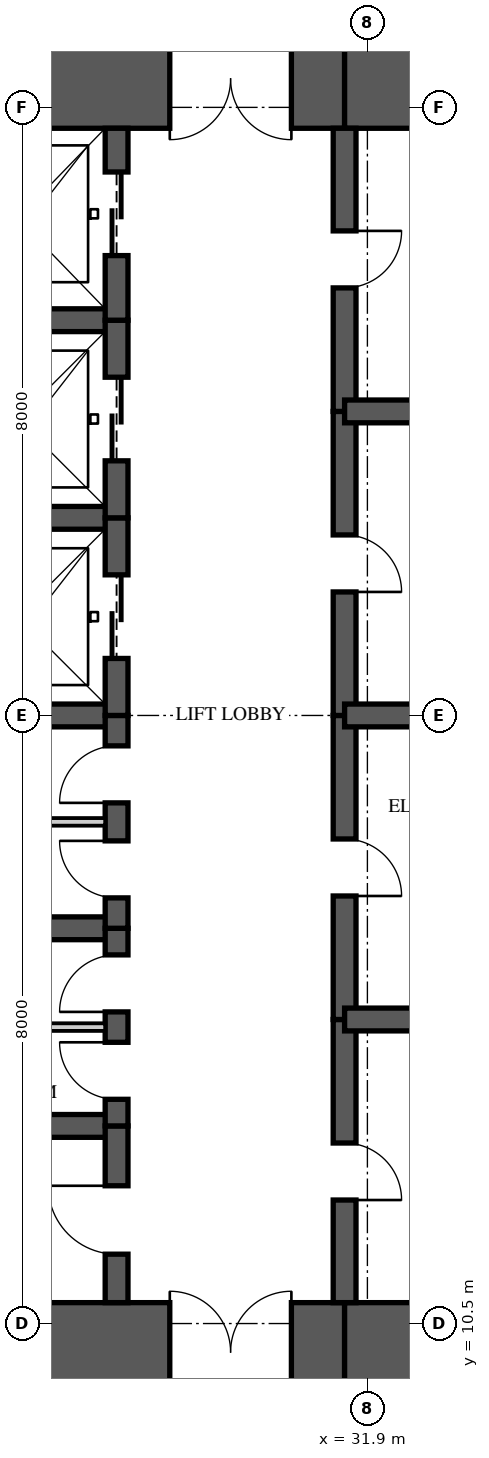
"""IFC4 building model, lengths in metres.
Left out: names, types, materials, properties, quantities, classifications, styles, units other than length and angle.
Written with IfcOpenShell. Run it as: python <this file> out.ifc"""

import sys

from ifc_helpers import new_model, si_unit, direction, frame, frame_2d, origin, place, context, subcontext, project, spatial, rectangle, extrude, element, fill, save


model = new_model("IFC4")
c1 = context("Model", 3, precision=1e-05, world=origin(), true_north=direction((0.0, 1.0)))
c2 = subcontext(c1, "Body", "Model", "MODEL_VIEW")
j1 = project(units=[si_unit("LENGTHUNIT", "METRE"), si_unit("PLANEANGLEUNIT", "RADIAN")], contexts=[c1])
p1 = place(None, origin())
s1 = spatial("IfcSite", under=j1, at=p1, CompositionType="ELEMENT")
p2 = place(p1, origin())
s2 = spatial("IfcBuilding", under=s1, at=p2, CompositionType="ELEMENT")
p3 = place(p2, frame((0.0, 0.0, 191.2)))
s3 = spatial("IfcBuildingStorey", under=s2, at=p3, CompositionType="ELEMENT", Elevation=191.2)
p4 = place(p3, frame((26.0, 10.125, 0.0), z_axis=(0.0, 0.0, 1.0), x_axis=(1.0, 0.0, 0.0)))
e1 = element("IfcWall", 1, at=p4, inside=s3, PredefinedType="SHEAR", context=c2, shape_type="SweptSolid", body=[
    extrude(rectangle(XDim=5.6, YDim=1.3, at=frame_2d((2.8, 0.0))), origin(), (0.0, 0.0, 1.0), 3.35),
])
p5 = place(p4, frame((3.3, 0.0, 0.0)))
e2 = element("IfcOpeningElement", 2, at=p5, cuts=e1, PredefinedType="OPENING", context=c2, shape_type="SweptSolid", body=[
    extrude(rectangle(XDim=1.6, YDim=2.1, at=frame_2d((0.8, 1.05))), frame((0.0, 0.66, 0.0), z_axis=(0.0, -1.0, 0.0), x_axis=(1.0, 0.0, 0.0)), (0.0, 0.0, 1.0), 1.32),
])
for number, where, z_axis, x_axis in (
    (3, (31.6, 10.125, 0.0), (0.0, 0.0, 1.0), (1.0, 0.0, 0.0)),
    (4, (35.9, 26.875, 0.0), (0.0, 0.0, 1.0), (-1.0, 0.0, 0.0)),
):
    element("IfcWall", number, at=place(p3, frame(where, z_axis=z_axis, x_axis=x_axis)), inside=s3, PredefinedType="SHEAR", context=c2, shape_type="SweptSolid", body=[
        extrude(rectangle(XDim=4.3, YDim=1.3, at=frame_2d((2.15, 0.0))), origin(), (0.0, 0.0, 1.0), 3.35),
    ])
p6 = place(p3, frame((31.6, 26.875, 0.0), z_axis=(0.0, 0.0, 1.0), x_axis=(-1.0, 0.0, 0.0)))
e5 = element("IfcWall", 5, at=p6, inside=s3, PredefinedType="SHEAR", context=c2, shape_type="SweptSolid", body=[
    extrude(rectangle(XDim=5.6, YDim=1.3, at=frame_2d((2.8, 0.0))), origin(), (0.0, 0.0, 1.0), 3.35),
])
p7 = place(p6, frame((0.7, 0.0, 0.0)))
e6 = element("IfcOpeningElement", 6, at=p7, cuts=e5, PredefinedType="OPENING", context=c2, shape_type="SweptSolid", body=[
    extrude(rectangle(XDim=1.6, YDim=2.1, at=frame_2d((0.8, 1.05))), frame((0.0, 0.66, 0.0), z_axis=(0.0, -1.0, 0.0), x_axis=(1.0, 0.0, 0.0)), (0.0, 0.0, 1.0), 1.32),
])
p8 = place(p3, frame((28.6, 10.775, 0.0), z_axis=(0.0, 0.0, 1.0), x_axis=(0.0, 1.0, 0.0)))
e7 = element("IfcWall", 7, at=p8, inside=s3, PredefinedType="SHEAR", context=c2, shape_type="SweptSolid", body=[
    extrude(rectangle(XDim=2.325, YDim=0.3, at=frame_2d((1.163, 0.0))), origin(), (0.0, 0.0, 1.0), 3.35),
])
p9 = place(p8, frame((0.637, 0.0, 0.0)))
e8 = element("IfcOpeningElement", 8, at=p9, cuts=e7, PredefinedType="OPENING", context=c2, shape_type="SweptSolid", body=[
    extrude(rectangle(XDim=0.9, YDim=2.1, at=frame_2d((0.45, 1.05))), frame((0.0, 0.16, 0.0), z_axis=(0.0, -1.0, 0.0), x_axis=(1.0, 0.0, 0.0)), (0.0, 0.0, 1.0), 0.32),
])
p10 = place(p3, frame((28.6, 13.1, 0.0), z_axis=(0.0, 0.0, 1.0), x_axis=(0.0, 1.0, 0.0)))
e9 = element("IfcWall", 9, at=p10, inside=s3, PredefinedType="SHEAR", context=c2, shape_type="SweptSolid", body=[
    extrude(rectangle(XDim=2.6, YDim=0.3, at=frame_2d((1.3, 0.0))), origin(), (0.0, 0.0, 1.0), 3.35),
])
p11 = place(p10, frame((0.35, 0.0, 0.0)))
e10 = element("IfcOpeningElement", 10, at=p11, cuts=e9, PredefinedType="OPENING", context=c2, shape_type="SweptSolid", body=[
    extrude(rectangle(XDim=0.75, YDim=2.1, at=frame_2d((0.375, 1.05))), frame((0.0, 0.16, 0.0), z_axis=(0.0, -1.0, 0.0), x_axis=(1.0, 0.0, 0.0)), (0.0, 0.0, 1.0), 0.32),
])
p12 = place(p10, frame((1.5, 0.0, 0.0)))
e11 = element("IfcOpeningElement", 11, at=p12, cuts=e9, PredefinedType="OPENING", context=c2, shape_type="SweptSolid", body=[
    extrude(rectangle(XDim=0.75, YDim=2.1, at=frame_2d((0.375, 1.05))), frame((0.0, 0.16, 0.0), z_axis=(0.0, -1.0, 0.0), x_axis=(1.0, 0.0, 0.0)), (0.0, 0.0, 1.0), 0.32),
])
p13 = place(p3, frame((28.6, 15.7, 0.0), z_axis=(0.0, 0.0, 1.0), x_axis=(0.0, 1.0, 0.0)))
e12 = element("IfcWall", 12, at=p13, inside=s3, PredefinedType="SHEAR", context=c2, shape_type="SweptSolid", body=[
    extrude(rectangle(XDim=2.8, YDim=0.3, at=frame_2d((1.4, 0.0))), origin(), (0.0, 0.0, 1.0), 3.35),
])
p14 = place(p13, frame((0.4, 0.0, 0.0)))
e13 = element("IfcOpeningElement", 13, at=p14, cuts=e12, PredefinedType="OPENING", context=c2, shape_type="SweptSolid", body=[
    extrude(rectangle(XDim=0.75, YDim=2.1, at=frame_2d((0.375, 1.05))), frame((0.0, 0.16, 0.0), z_axis=(0.0, -1.0, 0.0), x_axis=(1.0, 0.0, 0.0)), (0.0, 0.0, 1.0), 0.32),
])
p15 = place(p13, frame((1.65, 0.0, 0.0)))
e14 = element("IfcOpeningElement", 14, at=p15, cuts=e12, PredefinedType="OPENING", context=c2, shape_type="SweptSolid", body=[
    extrude(rectangle(XDim=0.75, YDim=2.1, at=frame_2d((0.375, 1.05))), frame((0.0, 0.16, 0.0), z_axis=(0.0, -1.0, 0.0), x_axis=(1.0, 0.0, 0.0)), (0.0, 0.0, 1.0), 0.32),
])
p16 = place(p3, frame((28.6, 18.5, 0.0), z_axis=(0.0, 0.0, 1.0), x_axis=(0.0, 1.0, 0.0)))
e15 = element("IfcWall", 15, at=p16, inside=s3, PredefinedType="SHEAR", context=c2, shape_type="SweptSolid", body=[
    extrude(rectangle(XDim=2.6, YDim=0.3, at=frame_2d((1.3, 0.0))), origin(), (0.0, 0.0, 1.0), 3.35),
])
p17 = place(p16, frame((0.75, 0.0, 0.0)))
e16 = element("IfcOpeningElement", 16, at=p17, cuts=e15, PredefinedType="OPENING", context=c2, shape_type="SweptSolid", body=[
    extrude(rectangle(XDim=1.1, YDim=2.1, at=frame_2d((0.55, 1.05))), frame((0.0, 0.16, 0.0), z_axis=(0.0, -1.0, 0.0), x_axis=(1.0, 0.0, 0.0)), (0.0, 0.0, 1.0), 0.32),
])
p18 = place(p3, frame((28.6, 21.1, 0.0), z_axis=(0.0, 0.0, 1.0), x_axis=(0.0, 1.0, 0.0)))
e17 = element("IfcWall", 17, at=p18, inside=s3, PredefinedType="SHEAR", context=c2, shape_type="SweptSolid", body=[
    extrude(rectangle(XDim=2.6, YDim=0.3, at=frame_2d((1.3, 0.0))), origin(), (0.0, 0.0, 1.0), 3.35),
])
p19 = place(p18, frame((0.75, 0.0, 0.0)))
e18 = element("IfcOpeningElement", 18, at=p19, cuts=e17, PredefinedType="OPENING", context=c2, shape_type="SweptSolid", body=[
    extrude(rectangle(XDim=1.1, YDim=2.1, at=frame_2d((0.55, 1.05))), frame((0.0, 0.16, 0.0), z_axis=(0.0, -1.0, 0.0), x_axis=(1.0, 0.0, 0.0)), (0.0, 0.0, 1.0), 0.32),
])
p20 = place(p3, frame((28.6, 23.7, 0.0), z_axis=(0.0, 0.0, 1.0), x_axis=(0.0, 1.0, 0.0)))
e19 = element("IfcWall", 19, at=p20, inside=s3, PredefinedType="SHEAR", context=c2, shape_type="SweptSolid", body=[
    extrude(rectangle(XDim=2.525, YDim=0.3, at=frame_2d((1.263, 0.0))), origin(), (0.0, 0.0, 1.0), 3.35),
])
p21 = place(p20, frame((0.85, 0.0, 0.0)))
e20 = element("IfcOpeningElement", 20, at=p21, cuts=e19, PredefinedType="OPENING", context=c2, shape_type="SweptSolid", body=[
    extrude(rectangle(XDim=1.1, YDim=2.1, at=frame_2d((0.55, 1.05))), frame((0.0, 0.16, 0.0), z_axis=(0.0, -1.0, 0.0), x_axis=(1.0, 0.0, 0.0)), (0.0, 0.0, 1.0), 0.32),
])
p22 = place(p3, frame((31.6, 10.775, 0.0), z_axis=(0.0, 0.0, 1.0), x_axis=(0.0, 1.0, 0.0)))
e21 = element("IfcWall", 21, at=p22, inside=s3, PredefinedType="SHEAR", context=c2, shape_type="SweptSolid", body=[
    extrude(rectangle(XDim=3.725, YDim=0.3, at=frame_2d((1.863, 0.0))), origin(), (0.0, 0.0, 1.0), 3.35),
])
p23 = place(p22, frame((1.35, 0.0, 0.0)))
e22 = element("IfcOpeningElement", 22, at=p23, cuts=e21, PredefinedType="OPENING", context=c2, shape_type="SweptSolid", body=[
    extrude(rectangle(XDim=0.75, YDim=2.1, at=frame_2d((0.375, 1.05))), frame((0.0, 0.16, 0.0), z_axis=(0.0, -1.0, 0.0), x_axis=(1.0, 0.0, 0.0)), (0.0, 0.0, 1.0), 0.32),
])
p24 = place(p3, frame((31.6, 14.5, 0.0), z_axis=(0.0, 0.0, 1.0), x_axis=(0.0, 1.0, 0.0)))
e23 = element("IfcWall", 23, at=p24, inside=s3, PredefinedType="SHEAR", context=c2, shape_type="SweptSolid", body=[
    extrude(rectangle(XDim=4.0, YDim=0.3, at=frame_2d((2.0, 0.0))), origin(), (0.0, 0.0, 1.0), 3.35),
])
p25 = place(p24, frame((1.625, 0.0, 0.0)))
e24 = element("IfcOpeningElement", 24, at=p25, cuts=e23, PredefinedType="OPENING", context=c2, shape_type="SweptSolid", body=[
    extrude(rectangle(XDim=0.75, YDim=2.1, at=frame_2d((0.375, 1.05))), frame((0.0, 0.16, 0.0), z_axis=(0.0, -1.0, 0.0), x_axis=(1.0, 0.0, 0.0)), (0.0, 0.0, 1.0), 0.32),
])
p26 = place(p3, frame((31.6, 18.5, 0.0), z_axis=(0.0, 0.0, 1.0), x_axis=(0.0, 1.0, 0.0)))
e25 = element("IfcWall", 25, at=p26, inside=s3, PredefinedType="SHEAR", context=c2, shape_type="SweptSolid", body=[
    extrude(rectangle(XDim=4.0, YDim=0.3, at=frame_2d((2.0, 0.0))), origin(), (0.0, 0.0, 1.0), 3.35),
])
p27 = place(p26, frame((1.625, 0.0, 0.0)))
e26 = element("IfcOpeningElement", 26, at=p27, cuts=e25, PredefinedType="OPENING", context=c2, shape_type="SweptSolid", body=[
    extrude(rectangle(XDim=0.75, YDim=2.1, at=frame_2d((0.375, 1.05))), frame((0.0, 0.16, 0.0), z_axis=(0.0, -1.0, 0.0), x_axis=(1.0, 0.0, 0.0)), (0.0, 0.0, 1.0), 0.32),
])
p28 = place(p3, frame((31.6, 22.5, 0.0), z_axis=(0.0, 0.0, 1.0), x_axis=(0.0, 1.0, 0.0)))
e27 = element("IfcWall", 27, at=p28, inside=s3, PredefinedType="SHEAR", context=c2, shape_type="SweptSolid", body=[
    extrude(rectangle(XDim=3.725, YDim=0.3, at=frame_2d((1.863, 0.0))), origin(), (0.0, 0.0, 1.0), 3.35),
])
p29 = place(p28, frame((1.625, 0.0, 0.0)))
e28 = element("IfcOpeningElement", 28, at=p29, cuts=e27, PredefinedType="OPENING", context=c2, shape_type="SweptSolid", body=[
    extrude(rectangle(XDim=0.75, YDim=2.1, at=frame_2d((0.375, 1.05))), frame((0.0, 0.16, 0.0), z_axis=(0.0, -1.0, 0.0), x_axis=(1.0, 0.0, 0.0)), (0.0, 0.0, 1.0), 0.32),
])
for number, where, z_axis, x_axis in (
    (29, (26.0, 13.1, 0.0), (0.0, 0.0, 1.0), (1.0, 0.0, 0.0)),
    (30, (26.0, 15.7, 0.0), (0.0, 0.0, 1.0), (1.0, 0.0, 0.0)),
    (31, (26.0, 18.5, 0.0), (0.0, 0.0, 1.0), (1.0, 0.0, 0.0)),
    (32, (26.0, 21.1, 0.0), (0.0, 0.0, 1.0), (1.0, 0.0, 0.0)),
    (33, (26.0, 23.7, 0.0), (0.0, 0.0, 1.0), (1.0, 0.0, 0.0)),
):
    element("IfcWall", number, at=place(p3, frame(where, z_axis=z_axis, x_axis=x_axis)), inside=s3, PredefinedType="SHEAR", context=c2, shape_type="SweptSolid", body=[
        extrude(rectangle(XDim=2.6, YDim=0.3, at=frame_2d((1.3, 0.0))), origin(), (0.0, 0.0, 1.0), 3.35),
    ])
for number, where, z_axis, x_axis in (
    (34, (31.6, 14.5, 0.0), (0.0, 0.0, 1.0), (1.0, 0.0, 0.0)),
    (35, (31.6, 18.5, 0.0), (0.0, 0.0, 1.0), (1.0, 0.0, 0.0)),
    (36, (31.6, 22.5, 0.0), (0.0, 0.0, 1.0), (1.0, 0.0, 0.0)),
):
    element("IfcWall", number, at=place(p3, frame(where, z_axis=z_axis, x_axis=x_axis)), inside=s3, PredefinedType="SHEAR", context=c2, shape_type="SweptSolid", body=[
        extrude(rectangle(XDim=4.3, YDim=0.3, at=frame_2d((2.15, 0.0))), origin(), (0.0, 0.0, 1.0), 3.35),
    ])
for number, where, z_axis, x_axis in (
    (37, (26.15, 14.4, 0.0), (0.0, 0.0, 1.0), (1.0, 0.0, 0.0)),
    (38, (26.15, 17.1, 0.0), (0.0, 0.0, 1.0), (1.0, 0.0, 0.0)),
):
    element("IfcWall", number, at=place(p3, frame(where, z_axis=z_axis, x_axis=x_axis)), inside=s3, PredefinedType="PARTITIONING", context=c2, shape_type="SweptSolid", body=[
        extrude(rectangle(XDim=2.3, YDim=0.1, at=frame_2d((1.15, 0.0))), origin(), (0.0, 0.0, 1.0), 3.11),
    ])
p30 = place(p17, origin())
e39 = element("IfcDoor", 39, at=p30, inside=s3, OperationType="SLIDING_TO_LEFT", PredefinedType="DOOR", context=c2, shape_type="SweptSolid", body=[
    extrude(rectangle(XDim=1.1, YDim=2.1, at=frame_2d((0.55, 1.05))), frame((0.0, 0.025, 0.0), z_axis=(0.0, -1.0, 0.0), x_axis=(1.0, 0.0, 0.0)), (0.0, 0.0, 1.0), 0.05),
])
fill(e16, e39)
p31 = place(p19, origin())
e40 = element("IfcDoor", 40, at=p31, inside=s3, OperationType="SLIDING_TO_LEFT", PredefinedType="DOOR", context=c2, shape_type="SweptSolid", body=[
    extrude(rectangle(XDim=1.1, YDim=2.1, at=frame_2d((0.55, 1.05))), frame((0.0, 0.025, 0.0), z_axis=(0.0, -1.0, 0.0), x_axis=(1.0, 0.0, 0.0)), (0.0, 0.0, 1.0), 0.05),
])
fill(e18, e40)
p32 = place(p21, origin())
e41 = element("IfcDoor", 41, at=p32, inside=s3, OperationType="SLIDING_TO_LEFT", PredefinedType="DOOR", context=c2, shape_type="SweptSolid", body=[
    extrude(rectangle(XDim=1.1, YDim=2.1, at=frame_2d((0.55, 1.05))), frame((0.0, 0.025, 0.0), z_axis=(0.0, -1.0, 0.0), x_axis=(1.0, 0.0, 0.0)), (0.0, 0.0, 1.0), 0.05),
])
fill(e20, e41)
p33 = place(p9, origin())
e42 = element("IfcDoor", 42, at=p33, inside=s3, OperationType="SINGLE_SWING_RIGHT", PredefinedType="DOOR", context=c2, shape_type="SweptSolid", body=[
    extrude(rectangle(XDim=0.9, YDim=2.1, at=frame_2d((0.45, 1.05))), frame((0.0, 0.025, 0.0), z_axis=(0.0, -1.0, 0.0), x_axis=(1.0, 0.0, 0.0)), (0.0, 0.0, 1.0), 0.05),
])
fill(e8, e42)
p34 = place(p11, origin())
e43 = element("IfcDoor", 43, at=p34, inside=s3, OperationType="SINGLE_SWING_RIGHT", PredefinedType="DOOR", context=c2, shape_type="SweptSolid", body=[
    extrude(rectangle(XDim=0.75, YDim=2.1, at=frame_2d((0.375, 1.05))), frame((0.0, 0.025, 0.0), z_axis=(0.0, -1.0, 0.0), x_axis=(1.0, 0.0, 0.0)), (0.0, 0.0, 1.0), 0.05),
])
fill(e10, e43)
p35 = place(p12, origin())
e44 = element("IfcDoor", 44, at=p35, inside=s3, OperationType="SINGLE_SWING_LEFT", PredefinedType="DOOR", context=c2, shape_type="SweptSolid", body=[
    extrude(rectangle(XDim=0.75, YDim=2.1, at=frame_2d((0.375, 1.05))), frame((0.0, 0.025, 0.0), z_axis=(0.0, -1.0, 0.0), x_axis=(1.0, 0.0, 0.0)), (0.0, 0.0, 1.0), 0.05),
])
fill(e11, e44)
p36 = place(p14, origin())
e45 = element("IfcDoor", 45, at=p36, inside=s3, OperationType="SINGLE_SWING_RIGHT", PredefinedType="DOOR", context=c2, shape_type="SweptSolid", body=[
    extrude(rectangle(XDim=0.75, YDim=2.1, at=frame_2d((0.375, 1.05))), frame((0.0, 0.025, 0.0), z_axis=(0.0, -1.0, 0.0), x_axis=(1.0, 0.0, 0.0)), (0.0, 0.0, 1.0), 0.05),
])
fill(e13, e45)
p37 = place(p15, origin())
e46 = element("IfcDoor", 46, at=p37, inside=s3, OperationType="SINGLE_SWING_LEFT", PredefinedType="DOOR", context=c2, shape_type="SweptSolid", body=[
    extrude(rectangle(XDim=0.75, YDim=2.1, at=frame_2d((0.375, 1.05))), frame((0.0, 0.025, 0.0), z_axis=(0.0, -1.0, 0.0), x_axis=(1.0, 0.0, 0.0)), (0.0, 0.0, 1.0), 0.05),
])
fill(e14, e46)
p38 = place(p5, origin())
e47 = element("IfcDoor", 47, at=p38, inside=s3, OperationType="DOUBLE_DOOR_SINGLE_SWING", PredefinedType="DOOR", context=c2, shape_type="SweptSolid", body=[
    extrude(rectangle(XDim=1.6, YDim=2.1, at=frame_2d((0.8, 1.05))), frame((0.0, 0.025, 0.0), z_axis=(0.0, -1.0, 0.0), x_axis=(1.0, 0.0, 0.0)), (0.0, 0.0, 1.0), 0.05),
])
fill(e2, e47)
p39 = place(p7, origin())
e48 = element("IfcDoor", 48, at=p39, inside=s3, OperationType="DOUBLE_DOOR_SINGLE_SWING", PredefinedType="DOOR", context=c2, shape_type="SweptSolid", body=[
    extrude(rectangle(XDim=1.6, YDim=2.1, at=frame_2d((0.8, 1.05))), frame((0.0, 0.025, 0.0), z_axis=(0.0, -1.0, 0.0), x_axis=(1.0, 0.0, 0.0)), (0.0, 0.0, 1.0), 0.05),
])
fill(e6, e48)
p40 = place(p23, frame((0.75, 0.0, 0.0), z_axis=(0.0, 0.0, 1.0), x_axis=(-1.0, 0.0, 0.0)))
e49 = element("IfcDoor", 49, at=p40, inside=s3, OperationType="SINGLE_SWING_RIGHT", PredefinedType="DOOR", context=c2, shape_type="SweptSolid", body=[
    extrude(rectangle(XDim=0.75, YDim=2.1, at=frame_2d((0.375, 1.05))), frame((0.0, 0.025, 0.0), z_axis=(0.0, -1.0, 0.0), x_axis=(1.0, 0.0, 0.0)), (0.0, 0.0, 1.0), 0.05),
])
fill(e22, e49)
p41 = place(p25, frame((0.75, 0.0, 0.0), z_axis=(0.0, 0.0, 1.0), x_axis=(-1.0, 0.0, 0.0)))
e50 = element("IfcDoor", 50, at=p41, inside=s3, OperationType="SINGLE_SWING_RIGHT", PredefinedType="DOOR", context=c2, shape_type="SweptSolid", body=[
    extrude(rectangle(XDim=0.75, YDim=2.1, at=frame_2d((0.375, 1.05))), frame((0.0, 0.025, 0.0), z_axis=(0.0, -1.0, 0.0), x_axis=(1.0, 0.0, 0.0)), (0.0, 0.0, 1.0), 0.05),
])
fill(e24, e50)
p42 = place(p27, frame((0.75, 0.0, 0.0), z_axis=(0.0, 0.0, 1.0), x_axis=(-1.0, 0.0, 0.0)))
e51 = element("IfcDoor", 51, at=p42, inside=s3, OperationType="SINGLE_SWING_RIGHT", PredefinedType="DOOR", context=c2, shape_type="SweptSolid", body=[
    extrude(rectangle(XDim=0.75, YDim=2.1, at=frame_2d((0.375, 1.05))), frame((0.0, 0.025, 0.0), z_axis=(0.0, -1.0, 0.0), x_axis=(1.0, 0.0, 0.0)), (0.0, 0.0, 1.0), 0.05),
])
fill(e26, e51)
p43 = place(p29, frame((0.75, 0.0, 0.0), z_axis=(0.0, 0.0, 1.0), x_axis=(-1.0, 0.0, 0.0)))
e52 = element("IfcDoor", 52, at=p43, inside=s3, OperationType="SINGLE_SWING_LEFT", PredefinedType="DOOR", context=c2, shape_type="SweptSolid", body=[
    extrude(rectangle(XDim=0.75, YDim=2.1, at=frame_2d((0.375, 1.05))), frame((0.0, 0.025, 0.0), z_axis=(0.0, -1.0, 0.0), x_axis=(1.0, 0.0, 0.0)), (0.0, 0.0, 1.0), 0.05),
])
fill(e28, e52)
save(model, sys.argv[1])
